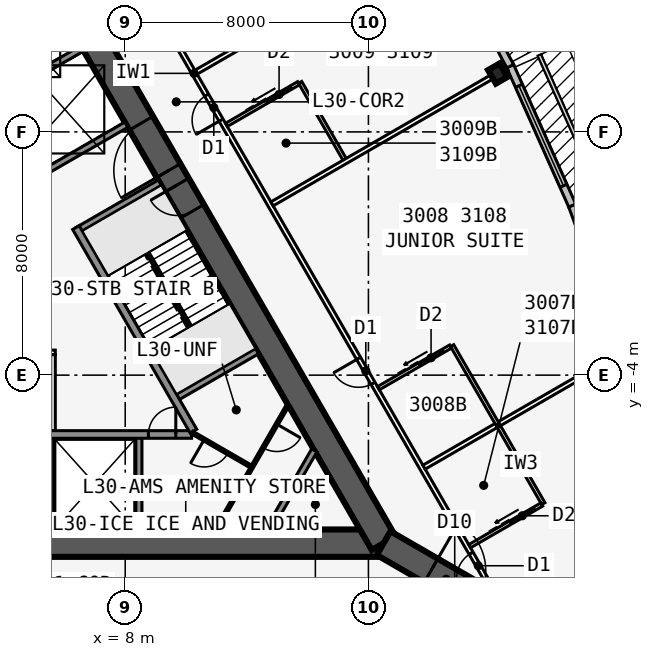
"""IFC4 building model, lengths in metres.
Left out: names, types, materials, properties, quantities, classifications, styles, units other than length and angle.
Written with IfcOpenShell. Run it as: python <this file> out.ifc"""

import sys

from ifc_helpers import new_model, si_unit, direction, frame, frame_2d, origin, origin_2d, place, context, subcontext, project, spatial, rectangle, i_section, extrude, element, fill, save


model = new_model("IFC4")
c1 = context("Model", 3, precision=1e-05, world=origin(), true_north=direction((0.0, 1.0)))
c2 = subcontext(c1, "Body", "Model", "MODEL_VIEW")
j1 = project(units=[si_unit("LENGTHUNIT", "METRE"), si_unit("PLANEANGLEUNIT", "RADIAN")], contexts=[c1])
p1 = place(None, origin())
s1 = spatial("IfcSite", under=j1, at=p1, CompositionType="ELEMENT")
p2 = place(p1, origin())
s2 = spatial("IfcBuilding", under=s1, at=p2, CompositionType="ELEMENT")
p3 = place(p2, frame((0.0, 0.0, 118.1)))
s3 = spatial("IfcBuildingStorey", under=s2, at=p3, CompositionType="ELEMENT", Elevation=118.1)
p4 = place(p3, frame((-16.5, -9.526, 0.0), z_axis=(0.0, 0.0, 1.0), x_axis=(1.0, 0.0, 0.0)))
e1 = element("IfcWall", 1, at=p4, inside=s3, PredefinedType="SHEAR", context=c2, shape_type="SweptSolid", body=[
    extrude(rectangle(XDim=33.0, YDim=0.9, at=frame_2d((16.5, 0.0))), origin(), (0.0, 0.0, 1.0), 3.4),
])
p5 = place(p4, frame((14.05, 0.0, 0.0)))
e2 = element("IfcOpeningElement", 2, at=p5, cuts=e1, PredefinedType="OPENING", context=c2, shape_type="SweptSolid", body=[
    extrude(rectangle(XDim=1.8, YDim=2.13, at=frame_2d((0.9, 1.065))), frame((0.0, 0.46, 0.0), z_axis=(0.0, -1.0, 0.0), x_axis=(1.0, 0.0, 0.0)), (0.0, 0.0, 1.0), 0.92),
])
p6 = place(p3, frame((-0.55, -5.951, 0.0), z_axis=(0.0, 0.0, 1.0), x_axis=(1.0, 0.0, 0.0)))
e3 = element("IfcWall", 3, at=p6, inside=s3, PredefinedType="SOLIDWALL", context=c2, shape_type="SweptSolid", body=[
    extrude(rectangle(XDim=10.733, YDim=0.25, at=frame_2d((5.366, 0.0))), origin(), (0.0, 0.0, 1.0), 3.235),
])
p7 = place(p6, frame((9.314, 0.0, 0.0)))
e4 = element("IfcOpeningElement", 4, at=p7, cuts=e3, PredefinedType="OPENING", context=c2, shape_type="SweptSolid", body=[
    extrude(rectangle(XDim=0.9, YDim=2.13, at=frame_2d((0.45, 1.065))), frame((0.0, 0.135, 0.0), z_axis=(0.0, -1.0, 0.0), x_axis=(1.0, 0.0, 0.0)), (0.0, 0.0, 1.0), 0.27),
])
p8 = place(p6, frame((1.05, 0.0, 0.0)))
e5 = element("IfcOpeningElement", 5, at=p8, cuts=e3, PredefinedType="OPENING", context=c2, shape_type="SweptSolid", body=[
    extrude(rectangle(XDim=1.1, YDim=2.13, at=frame_2d((0.55, 1.065))), frame((0.0, 0.135, 0.0), z_axis=(0.0, -1.0, 0.0), x_axis=(1.0, 0.0, 0.0)), (0.0, 0.0, 1.0), 0.27),
])
p9 = place(p6, frame((4.05, 0.0, 0.0)))
e6 = element("IfcOpeningElement", 6, at=p9, cuts=e3, PredefinedType="OPENING", context=c2, shape_type="SweptSolid", body=[
    extrude(rectangle(XDim=1.1, YDim=2.13, at=frame_2d((0.55, 1.065))), frame((0.0, 0.135, 0.0), z_axis=(0.0, -1.0, 0.0), x_axis=(1.0, 0.0, 0.0)), (0.0, 0.0, 1.0), 0.27),
])
for number, where, z_axis, x_axis in (
    (7, (5.55, -5.951, 0.0), (0.0, 0.0, 1.0), (0.0, -1.0, 0.0)),
    (8, (8.45, -5.951, 0.0), (0.0, 0.0, 1.0), (0.0, -1.0, 0.0)),
):
    element("IfcWall", number, at=place(p3, frame(where, z_axis=z_axis, x_axis=x_axis)), inside=s3, PredefinedType="SOLIDWALL", context=c2, shape_type="SweptSolid", body=[
        extrude(rectangle(XDim=3.125, YDim=0.2, at=frame_2d((1.562, 0.0))), origin(), (0.0, 0.0, 1.0), 3.235),
    ])
p10 = place(p3, frame((16.5, -9.526, 0.0), z_axis=(0.0, 0.0, 1.0), x_axis=(-0.499999749417, 0.866025548458, 0.0)))
e9 = element("IfcWall", 9, at=p10, inside=s3, PredefinedType="SHEAR", context=c2, shape_type="SweptSolid", body=[
    extrude(rectangle(XDim=33.0, YDim=0.9, at=frame_2d((16.5, 0.0))), origin(), (0.0, 0.0, 1.0), 3.4),
])
p11 = place(p10, frame((14.15, 0.0, 0.0)))
e10 = element("IfcOpeningElement", 10, at=p11, cuts=e9, PredefinedType="OPENING", context=c2, shape_type="SweptSolid", body=[
    extrude(rectangle(XDim=1.8, YDim=2.13, at=frame_2d((0.9, 1.065))), frame((0.0, 0.46, 0.0), z_axis=(0.0, -1.0, 0.0), x_axis=(1.0, 0.0, 0.0)), (0.0, 0.0, 1.0), 0.92),
])
p12 = place(p10, frame((12.6, 0.0, 0.0)))
e11 = element("IfcOpeningElement", 11, at=p12, cuts=e9, PredefinedType="OPENING", context=c2, shape_type="SweptSolid", body=[
    extrude(rectangle(XDim=1.0, YDim=2.13, at=frame_2d((0.5, 1.065))), frame((0.0, 0.46, 0.0), z_axis=(0.0, -1.0, 0.0), x_axis=(1.0, 0.0, 0.0)), (0.0, 0.0, 1.0), 0.92),
])
p13 = place(p3, frame((10.245, -5.843, 0.0), z_axis=(0.0, 0.0, 1.0), x_axis=(-0.499993009313, 0.866029439822, 0.0)))
e12 = element("IfcWall", 12, at=p13, inside=s3, PredefinedType="SOLIDWALL", context=c2, shape_type="SweptSolid", body=[
    extrude(rectangle(XDim=7.733, YDim=0.25, at=frame_2d((3.866, 0.0))), origin(), (0.0, 0.0, 1.0), 3.235),
])
for number, where, z_axis, x_axis in (
    (13, (9.629, -4.775, 0.0), (0.0, 0.0, 1.0), (0.866, 0.5, 0.0)),
    (14, (6.429, 0.767, 0.0), (0.0, 0.0, 1.0), (0.866, 0.5, 0.0)),
    (15, (5.329, 2.673, 0.0), (0.0, 0.0, 1.0), (0.866, 0.5, 0.0)),
    (16, (3.879, 5.184, 0.0), (0.0, 0.0, 1.0), (0.866, 0.5, 0.0)),
):
    element("IfcWall", number, at=place(p3, frame(where, z_axis=z_axis, x_axis=x_axis)), inside=s3, PredefinedType="SOLIDWALL", context=c2, shape_type="SweptSolid", body=[
        extrude(rectangle(XDim=3.125, YDim=0.2, at=frame_2d((1.562, 0.0))), origin(), (0.0, 0.0, 1.0), 3.235),
    ])
p14 = place(p3, frame((16.5, -9.526, 0.0), z_axis=(0.0, 0.0, 1.0), x_axis=(0.866031398331, -0.499989616998, 0.0)))
e17 = element("IfcWall", 17, at=p14, inside=s3, PredefinedType="SHEAR", context=c2, shape_type="SweptSolid", body=[
    extrude(rectangle(XDim=4.746, YDim=0.9, at=frame_2d((2.373, 0.0))), origin(), (0.0, 0.0, 1.0), 3.4),
])
p15 = place(p14, frame((1.8, 0.0, 0.0)))
e18 = element("IfcOpeningElement", 18, at=p15, cuts=e17, PredefinedType="OPENING", context=c2, shape_type="SweptSolid", body=[
    extrude(rectangle(XDim=1.8, YDim=2.13, at=frame_2d((0.9, 1.065))), frame((0.0, 0.46, 0.0), z_axis=(0.0, -1.0, 0.0), x_axis=(1.0, 0.0, 0.0)), (0.0, 0.0, 1.0), 0.92),
])
p16 = place(p3, frame((20.254, 5.92, 0.0), z_axis=(0.0, 0.0, 1.0), x_axis=(0.866025403784, 0.5, 0.0)))
e19 = element("IfcColumn", 19, at=p16, inside=s3, PredefinedType="COLUMN", context=c2, shape_type="SweptSolid", body=[
    extrude(i_section(OverallWidth=0.437, OverallDepth=0.513, WebThickness=0.061, FlangeThickness=0.097, at=origin_2d()), origin(), (0.0, 0.0, 1.0), 3.4),
])
p17 = place(p3, frame((24.444, -3.183, 0.0), z_axis=(0.0, 0.0, 1.0), x_axis=(-0.343225593282, 0.939252996863, 0.0)))
e20 = element("IfcWall", 20, at=p17, inside=s3, PredefinedType="STANDARD", context=c2, shape_type="SweptSolid", body=[
    extrude(rectangle(XDim=5.076, YDim=0.25, at=frame_2d((2.538, 0.0))), origin(), (0.0, 0.0, 1.0), 3.235),
])
p18 = place(p17, frame((0.738, 0.0, 0.45)))
e21 = element("IfcOpeningElement", 21, at=p18, cuts=e20, PredefinedType="OPENING", context=c2, shape_type="SweptSolid", body=[
    extrude(rectangle(XDim=3.6, YDim=2.4, at=frame_2d((1.8, 1.2))), frame((0.0, 0.135, 0.0), z_axis=(0.0, -1.0, 0.0), x_axis=(1.0, 0.0, 0.0)), (0.0, 0.0, 1.0), 0.27),
])
p19 = place(p3, frame((22.705, 1.576, 0.0), z_axis=(0.0, 0.0, 1.0), x_axis=(-0.406832200364, 0.913502906808, 0.0)))
e22 = element("IfcWall", 22, at=p19, inside=s3, PredefinedType="STANDARD", context=c2, shape_type="SweptSolid", body=[
    extrude(rectangle(XDim=5.028, YDim=0.25, at=frame_2d((2.514, 0.0))), origin(), (0.0, 0.0, 1.0), 3.235),
])
p20 = place(p19, frame((0.714, 0.0, 0.45)))
e23 = element("IfcOpeningElement", 23, at=p20, cuts=e22, PredefinedType="OPENING", context=c2, shape_type="SweptSolid", body=[
    extrude(rectangle(XDim=3.6, YDim=2.4, at=frame_2d((1.8, 1.2))), frame((0.0, 0.135, 0.0), z_axis=(0.0, -1.0, 0.0), x_axis=(1.0, 0.0, 0.0)), (0.0, 0.0, 1.0), 0.27),
])
p21 = place(p3, frame((20.663, 6.161, 0.0), z_axis=(0.0, 0.0, 1.0), x_axis=(-0.469404966864, 0.882982999317, 0.0)))
e24 = element("IfcWall", 24, at=p21, inside=s3, PredefinedType="STANDARD", context=c2, shape_type="SweptSolid", body=[
    extrude(rectangle(XDim=5.003, YDim=0.25, at=frame_2d((2.501, 0.0))), origin(), (0.0, 0.0, 1.0), 3.235),
])
p22 = place(p21, frame((0.701, 0.0, 0.45)))
e25 = element("IfcOpeningElement", 25, at=p22, cuts=e24, PredefinedType="OPENING", context=c2, shape_type="SweptSolid", body=[
    extrude(rectangle(XDim=3.6, YDim=2.4, at=frame_2d((1.8, 1.2))), frame((0.0, 0.135, 0.0), z_axis=(0.0, -1.0, 0.0), x_axis=(1.0, 0.0, 0.0)), (0.0, 0.0, 1.0), 0.27),
])
p23 = place(p3, frame((20.027, -10.985, 0.0), z_axis=(0.0, 0.0, 1.0), x_axis=(-0.500001677587, 0.866024435227, 0.0)))
e26 = element("IfcWall", 26, at=p23, inside=s3, PredefinedType="PARTITIONING", context=c2, shape_type="SweptSolid", body=[
    extrude(rectangle(XDim=39.054, YDim=0.15, at=frame_2d((19.527, 0.0))), origin(), (0.0, 0.0, 1.0), 3.235),
])
p24 = place(p23, frame((0.352, 0.0, 0.0)))
e27 = element("IfcOpeningElement", 27, at=p24, cuts=e26, PredefinedType="OPENING", context=c2, shape_type="SweptSolid", body=[
    extrude(rectangle(XDim=0.95, YDim=2.13, at=frame_2d((0.475, 1.065))), frame((0.0, 0.085, 0.0), z_axis=(0.0, -1.0, 0.0), x_axis=(1.0, 0.0, 0.0)), (0.0, 0.0, 1.0), 0.17),
])
p25 = place(p23, frame((7.752, 0.0, 0.0)))
e28 = element("IfcOpeningElement", 28, at=p25, cuts=e26, PredefinedType="OPENING", context=c2, shape_type="SweptSolid", body=[
    extrude(rectangle(XDim=0.95, YDim=2.13, at=frame_2d((0.475, 1.065))), frame((0.0, 0.085, 0.0), z_axis=(0.0, -1.0, 0.0), x_axis=(1.0, 0.0, 0.0)), (0.0, 0.0, 1.0), 0.17),
])
p26 = place(p23, frame((17.752, 0.0, 0.0)))
e29 = element("IfcOpeningElement", 29, at=p26, cuts=e26, PredefinedType="OPENING", context=c2, shape_type="SweptSolid", body=[
    extrude(rectangle(XDim=0.95, YDim=2.13, at=frame_2d((0.475, 1.065))), frame((0.0, 0.085, 0.0), z_axis=(0.0, -1.0, 0.0), x_axis=(1.0, 0.0, 0.0)), (0.0, 0.0, 1.0), 0.17),
])
p27 = place(p23, frame((22.152, 0.0, 0.0)))
e30 = element("IfcOpeningElement", 30, at=p27, cuts=e26, PredefinedType="OPENING", context=c2, shape_type="SweptSolid", body=[
    extrude(rectangle(XDim=0.95, YDim=2.13, at=frame_2d((0.475, 1.065))), frame((0.0, 0.085, 0.0), z_axis=(0.0, -1.0, 0.0), x_axis=(1.0, 0.0, 0.0)), (0.0, 0.0, 1.0), 0.17),
])
p28 = place(p23, frame((27.152, 0.0, 0.0)))
e31 = element("IfcOpeningElement", 31, at=p28, cuts=e26, PredefinedType="OPENING", context=c2, shape_type="SweptSolid", body=[
    extrude(rectangle(XDim=0.95, YDim=2.13, at=frame_2d((0.475, 1.065))), frame((0.0, 0.085, 0.0), z_axis=(0.0, -1.0, 0.0), x_axis=(1.0, 0.0, 0.0)), (0.0, 0.0, 1.0), 0.17),
])
p29 = place(p23, frame((36.546, 0.0, 0.0)))
e32 = element("IfcOpeningElement", 32, at=p29, cuts=e26, PredefinedType="OPENING", context=c2, shape_type="SweptSolid", body=[
    extrude(rectangle(XDim=0.95, YDim=2.13, at=frame_2d((0.475, 1.065))), frame((0.0, 0.085, 0.0), z_axis=(0.0, -1.0, 0.0), x_axis=(1.0, 0.0, 0.0)), (0.0, 0.0, 1.0), 0.17),
])
p30 = place(p3, frame((17.829, -7.027, 0.0), z_axis=(0.0, 0.0, 1.0), x_axis=(0.866029804378, 0.499992377871, 0.0)))
e33 = element("IfcWall", 33, at=p30, inside=s3, PredefinedType="PARTITIONING", context=c2, shape_type="SweptSolid", body=[
    extrude(rectangle(XDim=7.516, YDim=0.15, at=frame_2d((3.758, 0.0))), origin(), (0.0, 0.0, 1.0), 2.389),
])
p31 = place(p3, frame((12.829, 1.633, 0.0), z_axis=(0.0, 0.0, 1.0), x_axis=(0.866027015393, 0.499997208602, 0.0)))
e34 = element("IfcWall", 34, at=p31, inside=s3, PredefinedType="PARTITIONING", context=c2, shape_type="SweptSolid", body=[
    extrude(rectangle(XDim=8.922, YDim=0.15, at=frame_2d((4.461, 0.0))), origin(), (0.0, 0.0, 1.0), 2.389),
])
p32 = place(p3, frame((10.329, 5.963, 0.0), z_axis=(0.0, 0.0, 1.0), x_axis=(0.866025170687, 0.500000403736, 0.0)))
e35 = element("IfcWall", 35, at=p32, inside=s3, PredefinedType="PARTITIONING", context=c2, shape_type="SweptSolid", body=[
    extrude(rectangle(XDim=9.099, YDim=0.15, at=frame_2d((4.549, 0.0))), origin(), (0.0, 0.0, 1.0), 2.389),
])
p33 = place(p3, frame((21.753, -8.225, 0.0), z_axis=(0.0, 0.0, 1.0), x_axis=(-0.499990139034, 0.866031096941, 0.0)))
e36 = element("IfcWall", 36, at=p33, inside=s3, PredefinedType="PLUMBINGWALL", context=c2, shape_type="SweptSolid", body=[
    extrude(rectangle(XDim=3.0, YDim=0.12, at=frame_2d((1.5, 0.0))), origin(), (0.0, 0.0, 1.0), 3.235),
])
p34 = place(p3, frame((19.329, -9.625, 0.0), z_axis=(0.0, 0.0, 1.0), x_axis=(0.866035715982, 0.499982138324, 0.0)))
e37 = element("IfcWall", 37, at=p34, inside=s3, PredefinedType="PLUMBINGWALL", context=c2, shape_type="SweptSolid", body=[
    extrude(rectangle(XDim=2.74, YDim=0.12, at=frame_2d((1.37, 0.0))), origin(), (0.0, 0.0, 1.0), 3.235),
])
p35 = place(p34, frame((1.55, 0.0, 0.0)))
e38 = element("IfcOpeningElement", 38, at=p35, cuts=e37, PredefinedType="OPENING", context=c2, shape_type="SweptSolid", body=[
    extrude(rectangle(XDim=0.9, YDim=2.13, at=frame_2d((0.45, 1.065))), frame((0.0, 0.07, 0.0), z_axis=(0.0, -1.0, 0.0), x_axis=(1.0, 0.0, 0.0)), (0.0, 0.0, 1.0), 0.14),
])
p36 = place(p3, frame((20.253, -5.627, 0.0), z_axis=(0.0, 0.0, 1.0), x_axis=(-0.50002537861, 0.866010750942, 0.0)))
e39 = element("IfcWall", 39, at=p36, inside=s3, PredefinedType="PLUMBINGWALL", context=c2, shape_type="SweptSolid", body=[
    extrude(rectangle(XDim=3.0, YDim=0.12, at=frame_2d((1.5, 0.0))), origin(), (0.0, 0.0, 1.0), 3.235),
])
p37 = place(p3, frame((16.329, -4.429, 0.0), z_axis=(0.0, 0.0, 1.0), x_axis=(0.865997131366, 0.500048966069, 0.0)))
e40 = element("IfcWall", 40, at=p37, inside=s3, PredefinedType="PLUMBINGWALL", context=c2, shape_type="SweptSolid", body=[
    extrude(rectangle(XDim=2.74, YDim=0.12, at=frame_2d((1.37, 0.0))), origin(), (0.0, 0.0, 1.0), 3.235),
])
p38 = place(p37, frame((1.55, 0.0, 0.0)))
e41 = element("IfcOpeningElement", 41, at=p38, cuts=e40, PredefinedType="OPENING", context=c2, shape_type="SweptSolid", body=[
    extrude(rectangle(XDim=0.9, YDim=2.13, at=frame_2d((0.45, 1.065))), frame((0.0, 0.07, 0.0), z_axis=(0.0, -1.0, 0.0), x_axis=(1.0, 0.0, 0.0)), (0.0, 0.0, 1.0), 0.14),
])
p39 = place(p3, frame((15.253, 3.033, 0.0), z_axis=(0.0, 0.0, 1.0), x_axis=(-0.499990139034, 0.866031096941, 0.0)))
e42 = element("IfcWall", 42, at=p39, inside=s3, PredefinedType="PLUMBINGWALL", context=c2, shape_type="SweptSolid", body=[
    extrude(rectangle(XDim=3.0, YDim=0.12, at=frame_2d((1.5, 0.0))), origin(), (0.0, 0.0, 1.0), 3.235),
])
p40 = place(p3, frame((11.329, 4.231, 0.0), z_axis=(0.0, 0.0, 1.0), x_axis=(0.866035715982, 0.499982138324, 0.0)))
e43 = element("IfcWall", 43, at=p40, inside=s3, PredefinedType="PLUMBINGWALL", context=c2, shape_type="SweptSolid", body=[
    extrude(rectangle(XDim=2.74, YDim=0.12, at=frame_2d((1.37, 0.0))), origin(), (0.0, 0.0, 1.0), 3.235),
])
p41 = place(p40, frame((1.55, 0.0, 0.0)))
e44 = element("IfcOpeningElement", 44, at=p41, cuts=e43, PredefinedType="OPENING", context=c2, shape_type="SweptSolid", body=[
    extrude(rectangle(XDim=0.9, YDim=2.13, at=frame_2d((0.45, 1.065))), frame((0.0, 0.07, 0.0), z_axis=(0.0, -1.0, 0.0), x_axis=(1.0, 0.0, 0.0)), (0.0, 0.0, 1.0), 0.14),
])
p42 = place(p3, frame((-2.65, -3.251, 0.0), z_axis=(0.0, 0.0, 1.0), x_axis=(1.0, 0.0, 0.0)))
e45 = element("IfcWall", 45, at=p42, inside=s3, PredefinedType="PARTITIONING", context=c2, shape_type="SweptSolid", body=[
    extrude(rectangle(XDim=8.35, YDim=0.15, at=frame_2d((4.175, 0.0))), origin(), (0.0, 0.0, 1.0), 3.235),
])
p43 = place(p3, frame((5.625, -5.826, 0.0), z_axis=(0.0, 0.0, 1.0), x_axis=(0.0, 1.0, 0.0)))
e46 = element("IfcWall", 46, at=p43, inside=s3, PredefinedType="PARTITIONING", context=c2, shape_type="SweptSolid", body=[
    extrude(rectangle(XDim=2.5, YDim=0.15, at=frame_2d((1.25, 0.0))), origin(), (0.0, 0.0, 1.0), 3.235),
])
p44 = place(p3, frame((14.219, -6.476, 0.0), z_axis=(0.0, 0.0, 1.0), x_axis=(-0.499952404951, -0.866052881055, 0.0)))
e47 = element("IfcWall", 47, at=p44, inside=s3, PredefinedType="SOLIDWALL", context=c2, shape_type="SweptSolid", body=[
    extrude(rectangle(XDim=3.002, YDim=0.2, at=frame_2d((1.501, 0.0))), origin(), (0.0, 0.0, 1.0), 3.235),
])
p45 = place(p3, frame((13.354, -4.976, 0.0), z_axis=(0.0, 0.0, 1.0), x_axis=(-0.499999210213, -0.866025859768, 0.0)))
e48 = element("IfcWall", 48, at=p45, inside=s3, PredefinedType="PARTITIONING", context=c2, shape_type="SweptSolid", body=[
    extrude(rectangle(XDim=4.734, YDim=0.1, at=frame_2d((2.367, 0.0))), origin(), (0.0, 0.0, 1.0), 3.235),
])
p46 = place(p45, frame((0.734, 0.0, 0.0)))
e49 = element("IfcOpeningElement", 49, at=p46, cuts=e48, PredefinedType="OPENING", context=c2, shape_type="SweptSolid", body=[
    extrude(rectangle(XDim=0.9, YDim=2.13, at=frame_2d((0.45, 1.065))), frame((0.0, 0.06, 0.0), z_axis=(0.0, -1.0, 0.0), x_axis=(1.0, 0.0, 0.0)), (0.0, 0.0, 1.0), 0.12),
])
p47 = place(p3, frame((12.17, -7.026, 0.0), z_axis=(0.0, 0.0, 1.0), x_axis=(-0.866015833478, 0.50001657589, 0.0)))
e50 = element("IfcWall", 50, at=p47, inside=s3, PredefinedType="PARTITIONING", context=c2, shape_type="SweptSolid", body=[
    extrude(rectangle(XDim=2.275, YDim=0.1, at=frame_2d((1.138, 0.0))), origin(), (0.0, 0.0, 1.0), 3.235),
])
p48 = place(p47, frame((0.915, 0.0, 0.0)))
e51 = element("IfcOpeningElement", 51, at=p48, cuts=e50, PredefinedType="OPENING", context=c2, shape_type="SweptSolid", body=[
    extrude(rectangle(XDim=0.9, YDim=2.13, at=frame_2d((0.45, 1.065))), frame((0.0, 0.06, 0.0), z_axis=(0.0, -1.0, 0.0), x_axis=(1.0, 0.0, 0.0)), (0.0, 0.0, 1.0), 0.12),
])
p49 = place(p3, frame((10.135, -2.401, 0.0), z_axis=(0.0, 0.0, 1.0), x_axis=(-0.499992232847, 0.866029888106, 0.0)))
e52 = element("IfcWall", 52, at=p49, inside=s3, PredefinedType="SOLIDWALL", context=c2, shape_type="SweptSolid", body=[
    extrude(rectangle(XDim=2.794, YDim=0.1, at=frame_2d((1.397, 0.0))), origin(), (0.0, 0.0, 1.0), 3.4),
])
p50 = place(p20, origin())
e53 = element("IfcWindow", 53, at=p50, inside=s3, PartitioningType="SINGLE_PANEL", PredefinedType="WINDOW", context=c2, shape_type="SweptSolid", body=[
    extrude(rectangle(XDim=3.6, YDim=2.4, at=frame_2d((1.8, 1.2))), frame((0.0, 0.03, 0.0), z_axis=(0.0, -1.0, 0.0), x_axis=(1.0, 0.0, 0.0)), (0.0, 0.0, 1.0), 0.06),
])
fill(e23, e53)
p51 = place(p35, origin())
e54 = element("IfcDoor", 54, at=p51, inside=s3, OperationType="SLIDING_TO_LEFT", PredefinedType="DOOR", context=c2, shape_type="SweptSolid", body=[
    extrude(rectangle(XDim=0.9, YDim=2.13, at=frame_2d((0.45, 1.065))), frame((0.0, 0.025, 0.0), z_axis=(0.0, -1.0, 0.0), x_axis=(1.0, 0.0, 0.0)), (0.0, 0.0, 1.0), 0.05),
])
fill(e38, e54)
p52 = place(p24, origin())
e55 = element("IfcDoor", 55, at=p52, inside=s3, OperationType="SINGLE_SWING_LEFT", PredefinedType="DOOR", context=c2, shape_type="SweptSolid", body=[
    extrude(rectangle(XDim=0.95, YDim=2.13, at=frame_2d((0.475, 1.065))), frame((0.0, 0.025, 0.0), z_axis=(0.0, -1.0, 0.0), x_axis=(1.0, 0.0, 0.0)), (0.0, 0.0, 1.0), 0.05),
])
fill(e27, e55)
p53 = place(p38, origin())
e56 = element("IfcDoor", 56, at=p53, inside=s3, OperationType="SLIDING_TO_LEFT", PredefinedType="DOOR", context=c2, shape_type="SweptSolid", body=[
    extrude(rectangle(XDim=0.9, YDim=2.13, at=frame_2d((0.45, 1.065))), frame((0.0, 0.025, 0.0), z_axis=(0.0, -1.0, 0.0), x_axis=(1.0, 0.0, 0.0)), (0.0, 0.0, 1.0), 0.05),
])
fill(e41, e56)
p54 = place(p25, origin())
e57 = element("IfcDoor", 57, at=p54, inside=s3, OperationType="SINGLE_SWING_RIGHT", PredefinedType="DOOR", context=c2, shape_type="SweptSolid", body=[
    extrude(rectangle(XDim=0.95, YDim=2.13, at=frame_2d((0.475, 1.065))), frame((0.0, 0.025, 0.0), z_axis=(0.0, -1.0, 0.0), x_axis=(1.0, 0.0, 0.0)), (0.0, 0.0, 1.0), 0.05),
])
fill(e28, e57)
p55 = place(p41, origin())
e58 = element("IfcDoor", 58, at=p55, inside=s3, OperationType="SLIDING_TO_LEFT", PredefinedType="DOOR", context=c2, shape_type="SweptSolid", body=[
    extrude(rectangle(XDim=0.9, YDim=2.13, at=frame_2d((0.45, 1.065))), frame((0.0, 0.025, 0.0), z_axis=(0.0, -1.0, 0.0), x_axis=(1.0, 0.0, 0.0)), (0.0, 0.0, 1.0), 0.05),
])
fill(e44, e58)
p56 = place(p26, origin())
e59 = element("IfcDoor", 59, at=p56, inside=s3, OperationType="SINGLE_SWING_LEFT", PredefinedType="DOOR", context=c2, shape_type="SweptSolid", body=[
    extrude(rectangle(XDim=0.95, YDim=2.13, at=frame_2d((0.475, 1.065))), frame((0.0, 0.025, 0.0), z_axis=(0.0, -1.0, 0.0), x_axis=(1.0, 0.0, 0.0)), (0.0, 0.0, 1.0), 0.05),
])
fill(e29, e59)
p57 = place(p11, origin())
e60 = element("IfcDoor", 60, at=p57, inside=s3, OperationType="DOUBLE_DOOR_SINGLE_SWING", PredefinedType="DOOR", context=c2, shape_type="SweptSolid", body=[
    extrude(rectangle(XDim=1.8, YDim=2.13, at=frame_2d((0.9, 1.065))), frame((0.0, 0.025, 0.0), z_axis=(0.0, -1.0, 0.0), x_axis=(1.0, 0.0, 0.0)), (0.0, 0.0, 1.0), 0.05),
])
fill(e10, e60)
p58 = place(p12, origin())
e61 = element("IfcDoor", 61, at=p58, inside=s3, OperationType="SINGLE_SWING_RIGHT", PredefinedType="DOOR", context=c2, shape_type="SweptSolid", body=[
    extrude(rectangle(XDim=1.0, YDim=2.13, at=frame_2d((0.5, 1.065))), frame((0.0, 0.025, 0.0), z_axis=(0.0, -1.0, 0.0), x_axis=(1.0, 0.0, 0.0)), (0.0, 0.0, 1.0), 0.05),
])
fill(e11, e61)
p59 = place(p15, origin())
e62 = element("IfcDoor", 62, at=p59, inside=s3, OperationType="DOUBLE_DOOR_DOUBLE_SWING", PredefinedType="DOOR", context=c2, shape_type="SweptSolid", body=[
    extrude(rectangle(XDim=1.8, YDim=2.13, at=frame_2d((0.9, 1.065))), frame((0.0, 0.025, 0.0), z_axis=(0.0, -1.0, 0.0), x_axis=(1.0, 0.0, 0.0)), (0.0, 0.0, 1.0), 0.05),
])
fill(e18, e62)
p60 = place(p46, origin())
e63 = element("IfcDoor", 63, at=p60, inside=s3, OperationType="SINGLE_SWING_LEFT", PredefinedType="DOOR", context=c2, shape_type="SweptSolid", body=[
    extrude(rectangle(XDim=0.9, YDim=2.13, at=frame_2d((0.45, 1.065))), frame((0.0, 0.025, 0.0), z_axis=(0.0, -1.0, 0.0), x_axis=(1.0, 0.0, 0.0)), (0.0, 0.0, 1.0), 0.05),
])
fill(e49, e63)
p61 = place(p7, origin())
e64 = element("IfcDoor", 64, at=p61, inside=s3, OperationType="SINGLE_SWING_RIGHT", PredefinedType="DOOR", context=c2, shape_type="SweptSolid", body=[
    extrude(rectangle(XDim=0.9, YDim=2.13, at=frame_2d((0.45, 1.065))), frame((0.0, 0.025, 0.0), z_axis=(0.0, -1.0, 0.0), x_axis=(1.0, 0.0, 0.0)), (0.0, 0.0, 1.0), 0.05),
])
fill(e4, e64)
p62 = place(p48, origin())
e65 = element("IfcDoor", 65, at=p62, inside=s3, OperationType="SINGLE_SWING_RIGHT", PredefinedType="DOOR", context=c2, shape_type="SweptSolid", body=[
    extrude(rectangle(XDim=0.9, YDim=2.13, at=frame_2d((0.45, 1.065))), frame((0.0, 0.025, 0.0), z_axis=(0.0, -1.0, 0.0), x_axis=(1.0, 0.0, 0.0)), (0.0, 0.0, 1.0), 0.05),
])
fill(e51, e65)
save(model, sys.argv[1])
